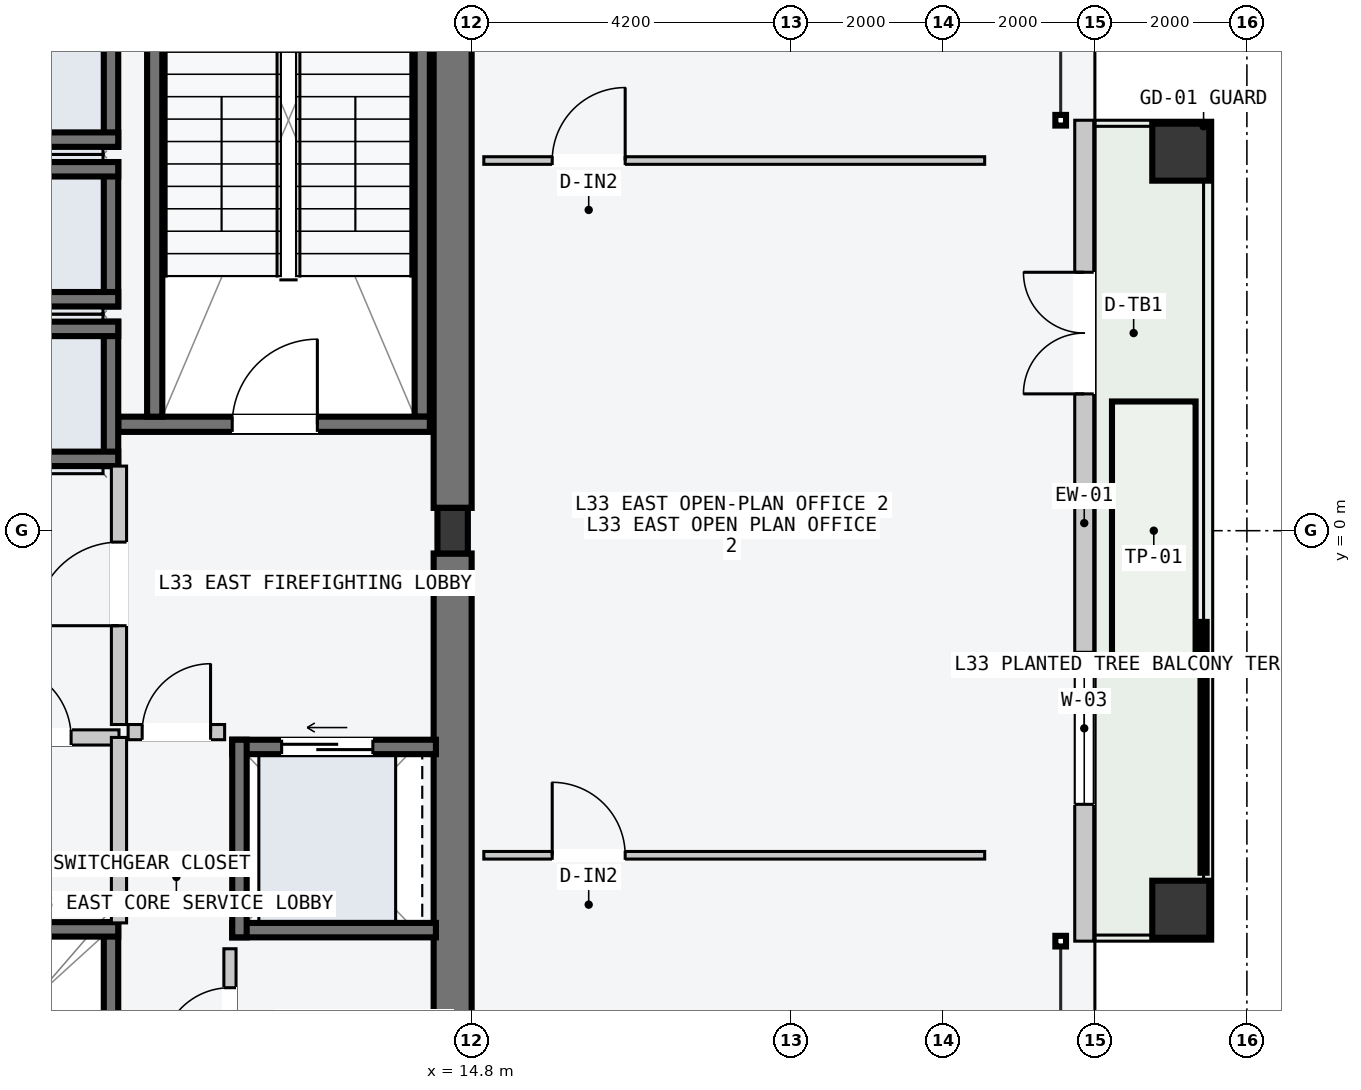
"""IFC4 building model, lengths in metres.
Left out: names, types, materials, properties, quantities, classifications, styles, units other than length and angle.
Written with IfcOpenShell. Run it as: python <this file> out.ifc"""

import sys

from ifc_helpers import new_model, si_unit, direction, frame, frame_2d, origin, origin_2d, place, context, subcontext, project, spatial, rectangle, hollow_rectangle, i_section, extrude, element, fill, save


model = new_model("IFC4")
c1 = context("Model", 3, precision=1e-05, world=origin(), true_north=direction((0.0, 1.0)))
c2 = subcontext(c1, "Body", "Model", "MODEL_VIEW")
j1 = project(units=[si_unit("LENGTHUNIT", "METRE"), si_unit("PLANEANGLEUNIT", "RADIAN")], contexts=[c1])
p1 = place(None, origin())
s1 = spatial("IfcSite", under=j1, at=p1, CompositionType="ELEMENT")
p2 = place(p1, origin())
s2 = spatial("IfcBuilding", under=s1, at=p2, CompositionType="ELEMENT")
p3 = place(p2, frame((0.0, 0.0, 127.8)))
s3 = spatial("IfcBuildingStorey", under=s2, at=p3, CompositionType="ELEMENT", Elevation=127.8)
for number, where, z_axis, x_axis in (
    (1, (14.55, -9.45, -0.2), (0.0, 0.0, 1.0), (0.0, 1.0, 0.0)),
    (2, (14.55, 0.3, -0.2), (0.0, 0.0, 1.0), (0.0, 1.0, 0.0)),
):
    element("IfcWall", number, at=place(p3, frame(where, z_axis=z_axis, x_axis=x_axis)), inside=s3, PredefinedType="SHEAR", context=c2, shape_type="SweptSolid", body=[
        extrude(rectangle(XDim=9.15, YDim=0.5, at=frame_2d((4.575, 0.0))), origin(), (0.0, 0.0, 1.0), 3.6),
    ])
p4 = place(p3, frame((14.15, 1.5, -0.2), z_axis=(0.0, 0.0, 1.0), x_axis=(0.0, 1.0, 0.0)))
e3 = element("IfcWall", 3, at=p4, inside=s3, PredefinedType="SOLIDWALL", context=c2, shape_type="SweptSolid", body=[
    extrude(rectangle(XDim=7.8, YDim=0.2, at=frame_2d((3.9, 0.0))), origin(), (0.0, 0.0, 1.0), 3.6),
])
p5 = place(p3, frame((10.15, 1.4, -0.2), z_axis=(0.0, 0.0, 1.0), x_axis=(1.0, 0.0, 0.0)))
e4 = element("IfcWall", 4, at=p5, inside=s3, PredefinedType="SOLIDWALL", context=c2, shape_type="SweptSolid", body=[
    extrude(rectangle(XDim=4.1, YDim=0.2, at=frame_2d((2.05, 0.0))), origin(), (0.0, 0.0, 1.0), 3.6),
])
p6 = place(p5, frame((1.5, 0.0, 0.2)))
e5 = element("IfcOpeningElement", 5, at=p6, cuts=e4, PredefinedType="OPENING", context=c2, shape_type="SweptSolid", body=[
    extrude(rectangle(XDim=1.12, YDim=2.18, at=frame_2d((0.56, 1.09))), frame((0.0, 0.11, 0.0), z_axis=(0.0, -1.0, 0.0), x_axis=(1.0, 0.0, 0.0)), (0.0, 0.0, 1.0), 0.22),
])
p7 = place(p3, frame((10.63, 1.5, -0.2), z_axis=(0.0, 0.0, 1.0), x_axis=(0.0, 1.0, 0.0)))
e6 = element("IfcWall", 6, at=p7, inside=s3, PredefinedType="SOLIDWALL", context=c2, shape_type="SweptSolid", body=[
    extrude(rectangle(XDim=7.8, YDim=0.2, at=frame_2d((3.9, 0.0))), origin(), (0.0, 0.0, 1.0), 3.6),
])
p8 = place(p3, frame((14.55, 0.0, 0.0), z_axis=(0.0, 0.0, 1.0), x_axis=(1.0, 0.0, 0.0)))
e7 = element("IfcColumn", 7, at=p8, inside=s3, PredefinedType="COLUMN", context=c2, shape_type="SweptSolid", body=[
    extrude(i_section(OverallWidth=0.4, OverallDepth=0.6, WebThickness=0.022, FlangeThickness=0.036, at=origin_2d()), origin(), (0.0, 0.0, 1.0), 3.6),
])
for number, where, z_axis, x_axis in (
    (8, (24.13, -4.98, 0.0), (0.0, 0.0, 1.0), (0.0, 1.0, 0.0)),
    (9, (24.13, 4.98, 0.0), (0.0, 0.0, 1.0), (0.0, 1.0, 0.0)),
):
    element("IfcColumn", number, at=place(p3, frame(where, z_axis=z_axis, x_axis=x_axis)), inside=s3, PredefinedType="COLUMN", context=c2, shape_type="SweptSolid", body=[
        extrude(hollow_rectangle(XDim=0.75, YDim=0.75, WallThickness=0.032, at=origin_2d()), origin(), (0.0, 0.0, 1.0), 3.6),
    ])
p9 = place(p3, frame((22.86, -5.4, 0.0), z_axis=(0.0, 0.0, 1.0), x_axis=(0.0, 1.0, 0.0)))
e10 = element("IfcWall", 10, at=p9, inside=s3, PredefinedType="STANDARD", context=c2, shape_type="SweptSolid", body=[
    extrude(rectangle(XDim=10.8, YDim=0.25, at=frame_2d((5.4, 0.0))), origin(), (0.0, 0.0, 1.0), 3.4),
])
p10 = place(p9, frame((7.2, 0.0, 0.0)))
e11 = element("IfcOpeningElement", 11, at=p10, cuts=e10, PredefinedType="OPENING", context=c2, shape_type="SweptSolid", body=[
    extrude(rectangle(XDim=1.6, YDim=2.2, at=frame_2d((0.8, 1.1))), frame((0.0, 0.135, 0.0), z_axis=(0.0, -1.0, 0.0), x_axis=(1.0, 0.0, 0.0)), (0.0, 0.0, 1.0), 0.27),
])
p11 = place(p9, frame((1.8, 0.0, 0.85)))
e12 = element("IfcOpeningElement", 12, at=p11, cuts=e10, PredefinedType="OPENING", context=c2, shape_type="SweptSolid", body=[
    extrude(rectangle(XDim=2.0, YDim=2.1, at=frame_2d((1.0, 1.05))), frame((0.0, 0.135, 0.0), z_axis=(0.0, -1.0, 0.0), x_axis=(1.0, 0.0, 0.0)), (0.0, 0.0, 1.0), 0.27),
])
p12 = place(p3, frame((10.055, 0.85, -0.2), z_axis=(0.0, 0.0, 1.0), x_axis=(0.0, 1.0, 0.0)))
e13 = element("IfcWall", 13, at=p12, inside=s3, PredefinedType="SOLIDWALL", context=c2, shape_type="SweptSolid", body=[
    extrude(rectangle(XDim=1.9, YDim=0.19, at=frame_2d((0.95, 0.0))), origin(), (0.0, 0.0, 1.0), 3.6),
])
for number, where, z_axis, x_axis in (
    (14, (7.95, 2.655, -0.2), (0.0, 0.0, 1.0), (1.0, 0.0, 0.0)),
    (15, (7.95, 0.945, -0.2), (0.0, 0.0, 1.0), (1.0, 0.0, 0.0)),
):
    element("IfcWall", number, at=place(p3, frame(where, z_axis=z_axis, x_axis=x_axis)), inside=s3, PredefinedType="SOLIDWALL", context=c2, shape_type="SweptSolid", body=[
        extrude(rectangle(XDim=2.2, YDim=0.19, at=frame_2d((1.1, 0.0))), origin(), (0.0, 0.0, 1.0), 3.6),
    ])
p13 = place(p3, frame((10.055, 2.95, -0.2), z_axis=(0.0, 0.0, 1.0), x_axis=(0.0, 1.0, 0.0)))
e16 = element("IfcWall", 16, at=p13, inside=s3, PredefinedType="SOLIDWALL", context=c2, shape_type="SweptSolid", body=[
    extrude(rectangle(XDim=1.9, YDim=0.19, at=frame_2d((0.95, 0.0))), origin(), (0.0, 0.0, 1.0), 3.6),
])
for number, where, z_axis, x_axis in (
    (17, (7.95, 4.755, -0.2), (0.0, 0.0, 1.0), (1.0, 0.0, 0.0)),
    (18, (7.95, 3.045, -0.2), (0.0, 0.0, 1.0), (1.0, 0.0, 0.0)),
):
    element("IfcWall", number, at=place(p3, frame(where, z_axis=z_axis, x_axis=x_axis)), inside=s3, PredefinedType="SOLIDWALL", context=c2, shape_type="SweptSolid", body=[
        extrude(rectangle(XDim=2.2, YDim=0.19, at=frame_2d((1.1, 0.0))), origin(), (0.0, 0.0, 1.0), 3.6),
    ])
p14 = place(p3, frame((10.055, 5.05, -0.2), z_axis=(0.0, 0.0, 1.0), x_axis=(0.0, 1.0, 0.0)))
e19 = element("IfcWall", 19, at=p14, inside=s3, PredefinedType="SOLIDWALL", context=c2, shape_type="SweptSolid", body=[
    extrude(rectangle(XDim=1.9, YDim=0.19, at=frame_2d((0.95, 0.0))), origin(), (0.0, 0.0, 1.0), 3.6),
])
p15 = place(p3, frame((7.95, 5.145, -0.2), z_axis=(0.0, 0.0, 1.0), x_axis=(1.0, 0.0, 0.0)))
e20 = element("IfcWall", 20, at=p15, inside=s3, PredefinedType="SOLIDWALL", context=c2, shape_type="SweptSolid", body=[
    extrude(rectangle(XDim=2.2, YDim=0.19, at=frame_2d((1.1, 0.0))), origin(), (0.0, 0.0, 1.0), 3.6),
])
p16 = place(p3, frame((10.055, -7.15, -0.2), z_axis=(0.0, 0.0, 1.0), x_axis=(0.0, 1.0, 0.0)))
e21 = element("IfcWall", 21, at=p16, inside=s3, PredefinedType="SOLIDWALL", context=c2, shape_type="SweptSolid", body=[
    extrude(rectangle(XDim=2.0, YDim=0.19, at=frame_2d((1.0, 0.0))), origin(), (0.0, 0.0, 1.0), 3.6),
])
p17 = place(p3, frame((7.95, -5.245, -0.2), z_axis=(0.0, 0.0, 1.0), x_axis=(1.0, 0.0, 0.0)))
e22 = element("IfcWall", 22, at=p17, inside=s3, PredefinedType="SOLIDWALL", context=c2, shape_type="SweptSolid", body=[
    extrude(rectangle(XDim=2.2, YDim=0.19, at=frame_2d((1.1, 0.0))), origin(), (0.0, 0.0, 1.0), 3.6),
])
p18 = place(p3, frame((11.65, -2.845, -0.2), z_axis=(0.0, 0.0, 1.0), x_axis=(1.0, 0.0, 0.0)))
e23 = element("IfcWall", 23, at=p18, inside=s3, PredefinedType="SOLIDWALL", context=c2, shape_type="SweptSolid", body=[
    extrude(rectangle(XDim=2.68, YDim=0.19, at=frame_2d((1.34, 0.0))), origin(), (0.0, 0.0, 1.0), 3.6),
])
p19 = place(p18, frame((0.65, 0.0, 0.2)))
e24 = element("IfcOpeningElement", 24, at=p19, cuts=e23, PredefinedType="OPENING", context=c2, shape_type="SweptSolid", body=[
    extrude(rectangle(XDim=1.2, YDim=2.2, at=frame_2d((0.6, 1.1))), frame((0.0, 0.105, 0.0), z_axis=(0.0, -1.0, 0.0), x_axis=(1.0, 0.0, 0.0)), (0.0, 0.0, 1.0), 0.21),
])
p20 = place(p3, frame((11.65, -5.255, -0.2), z_axis=(0.0, 0.0, 1.0), x_axis=(1.0, 0.0, 0.0)))
e25 = element("IfcWall", 25, at=p20, inside=s3, PredefinedType="SOLIDWALL", context=c2, shape_type="SweptSolid", body=[
    extrude(rectangle(XDim=2.68, YDim=0.19, at=frame_2d((1.34, 0.0))), origin(), (0.0, 0.0, 1.0), 3.6),
])
p21 = place(p3, frame((11.745, -5.35, -0.2), z_axis=(0.0, 0.0, 1.0), x_axis=(0.0, 1.0, 0.0)))
e26 = element("IfcWall", 26, at=p21, inside=s3, PredefinedType="SOLIDWALL", context=c2, shape_type="SweptSolid", body=[
    extrude(rectangle(XDim=2.6, YDim=0.19, at=frame_2d((1.3, 0.0))), origin(), (0.0, 0.0, 1.0), 3.6),
])
p22 = place(p3, frame((10.16, -2.55, 0.0), z_axis=(0.0, 0.0, 1.0), x_axis=(0.0, 1.0, 0.0)))
e27 = element("IfcWall", 27, at=p22, inside=s3, PredefinedType="PARTITIONING", context=c2, shape_type="SweptSolid", body=[
    extrude(rectangle(XDim=3.4, YDim=0.2, at=frame_2d((1.7, 0.0))), origin(), (0.0, 0.0, 1.0), 3.4),
])
p23 = place(p22, frame((1.3, 0.0, 0.0)))
e28 = element("IfcOpeningElement", 28, at=p23, cuts=e27, PredefinedType="OPENING", context=c2, shape_type="SweptSolid", body=[
    extrude(rectangle(XDim=1.1, YDim=2.15, at=frame_2d((0.55, 1.075))), frame((0.0, 0.11, 0.0), z_axis=(0.0, -1.0, 0.0), x_axis=(1.0, 0.0, 0.0)), (0.0, 0.0, 1.0), 0.22),
])
p24 = place(p3, frame((10.28, -2.65, 0.0), z_axis=(0.0, 0.0, 1.0), x_axis=(1.0, 0.0, 0.0)))
e29 = element("IfcWall", 29, at=p24, inside=s3, PredefinedType="PARTITIONING", context=c2, shape_type="SweptSolid", body=[
    extrude(rectangle(XDim=1.27, YDim=0.2, at=frame_2d((0.635, 0.0))), origin(), (0.0, 0.0, 1.0), 3.4),
])
p25 = place(p24, frame((0.185, 0.0, 0.0)))
e30 = element("IfcOpeningElement", 30, at=p25, cuts=e29, PredefinedType="OPENING", context=c2, shape_type="SweptSolid", body=[
    extrude(rectangle(XDim=0.9, YDim=2.15, at=frame_2d((0.45, 1.075))), frame((0.0, 0.11, 0.0), z_axis=(0.0, -1.0, 0.0), x_axis=(1.0, 0.0, 0.0)), (0.0, 0.0, 1.0), 0.22),
])
p26 = place(p3, frame((7.96, -2.72, 0.0), z_axis=(0.0, 0.0, 1.0), x_axis=(1.0, 0.0, 0.0)))
e31 = element("IfcWall", 31, at=p26, inside=s3, PredefinedType="PARTITIONING", context=c2, shape_type="SweptSolid", body=[
    extrude(rectangle(XDim=2.2, YDim=0.2, at=frame_2d((1.1, 0.0))), origin(), (0.0, 0.0, 1.0), 3.4),
])
p27 = place(p26, frame((0.62, 0.0, 0.0)))
e32 = element("IfcOpeningElement", 32, at=p27, cuts=e31, PredefinedType="OPENING", context=c2, shape_type="SweptSolid", body=[
    extrude(rectangle(XDim=0.95, YDim=2.1, at=frame_2d((0.475, 1.05))), frame((0.0, 0.11, 0.0), z_axis=(0.0, -1.0, 0.0), x_axis=(1.0, 0.0, 0.0)), (0.0, 0.0, 1.0), 0.22),
])
p28 = place(p3, frame((10.16, -5.16, 0.0), z_axis=(0.0, 0.0, 1.0), x_axis=(0.0, 1.0, 0.0)))
e33 = element("IfcWall", 33, at=p28, inside=s3, PredefinedType="PARTITIONING", context=c2, shape_type="SweptSolid", body=[
    extrude(rectangle(XDim=2.44, YDim=0.2, at=frame_2d((1.22, 0.0))), origin(), (0.0, 0.0, 1.0), 3.4),
])
p29 = place(p3, frame((11.62, -9.35, 0.0), z_axis=(0.0, 0.0, 1.0), x_axis=(0.0, 1.0, 0.0)))
e34 = element("IfcWall", 34, at=p29, inside=s3, PredefinedType="PARTITIONING", context=c2, shape_type="SweptSolid", body=[
    extrude(rectangle(XDim=3.85, YDim=0.16, at=frame_2d((1.925, 0.0))), origin(), (0.0, 0.0, 1.0), 3.4),
])
p30 = place(p29, frame((0.512, 0.0, 0.0)))
e35 = element("IfcOpeningElement", 35, at=p30, cuts=e34, PredefinedType="OPENING", context=c2, shape_type="SweptSolid", body=[
    extrude(rectangle(XDim=0.9, YDim=2.15, at=frame_2d((0.45, 1.075))), frame((0.0, 0.09, 0.0), z_axis=(0.0, -1.0, 0.0), x_axis=(1.0, 0.0, 0.0)), (0.0, 0.0, 1.0), 0.18),
])
p31 = place(p29, frame((2.438, 0.0, 0.0)))
e36 = element("IfcOpeningElement", 36, at=p31, cuts=e34, PredefinedType="OPENING", context=c2, shape_type="SweptSolid", body=[
    extrude(rectangle(XDim=0.9, YDim=2.15, at=frame_2d((0.45, 1.075))), frame((0.0, 0.09, 0.0), z_axis=(0.0, -1.0, 0.0), x_axis=(1.0, 0.0, 0.0)), (0.0, 0.0, 1.0), 0.18),
])
p32 = place(p3, frame((14.96, -4.27, 0.0), z_axis=(0.0, 0.0, 1.0), x_axis=(1.0, 0.0, 0.0)))
e37 = element("IfcWall", 37, at=p32, inside=s3, PredefinedType="PARTITIONING", context=c2, shape_type="SweptSolid", body=[
    extrude(rectangle(XDim=6.59, YDim=0.1, at=frame_2d((3.295, 0.0))), origin(), (0.0, 0.0, 1.0), 3.4),
])
p33 = place(p32, frame((0.9, 0.0, 0.0)))
e38 = element("IfcOpeningElement", 38, at=p33, cuts=e37, PredefinedType="OPENING", context=c2, shape_type="SweptSolid", body=[
    extrude(rectangle(XDim=0.96, YDim=2.18, at=frame_2d((0.48, 1.09))), frame((0.0, 0.06, 0.0), z_axis=(0.0, -1.0, 0.0), x_axis=(1.0, 0.0, 0.0)), (0.0, 0.0, 1.0), 0.12),
])
p34 = place(p3, frame((14.96, 4.87, 0.0), z_axis=(0.0, 0.0, 1.0), x_axis=(1.0, 0.0, 0.0)))
e39 = element("IfcWall", 39, at=p34, inside=s3, PredefinedType="PARTITIONING", context=c2, shape_type="SweptSolid", body=[
    extrude(rectangle(XDim=6.59, YDim=0.1, at=frame_2d((3.295, 0.0))), origin(), (0.0, 0.0, 1.0), 3.4),
])
p35 = place(p34, frame((0.9, 0.0, 0.0)))
e40 = element("IfcOpeningElement", 40, at=p35, cuts=e39, PredefinedType="OPENING", context=c2, shape_type="SweptSolid", body=[
    extrude(rectangle(XDim=0.96, YDim=2.18, at=frame_2d((0.48, 1.09))), frame((0.0, 0.06, 0.0), z_axis=(0.0, -1.0, 0.0), x_axis=(1.0, 0.0, 0.0)), (0.0, 0.0, 1.0), 0.12),
])
p36 = place(p6, origin())
e41 = element("IfcDoor", 41, at=p36, inside=s3, OperationType="SINGLE_SWING_RIGHT", PredefinedType="DOOR", context=c2, shape_type="SweptSolid", body=[
    extrude(rectangle(XDim=1.12, YDim=2.18, at=frame_2d((0.56, 1.09))), frame((0.0, 0.025, 0.0), z_axis=(0.0, -1.0, 0.0), x_axis=(1.0, 0.0, 0.0)), (0.0, 0.0, 1.0), 0.05),
])
fill(e5, e41)
p37 = place(p10, origin())
e42 = element("IfcDoor", 42, at=p37, inside=s3, OperationType="DOUBLE_DOOR_SINGLE_SWING", PredefinedType="DOOR", context=c2, shape_type="SweptSolid", body=[
    extrude(rectangle(XDim=1.6, YDim=2.2, at=frame_2d((0.8, 1.1))), frame((0.0, 0.025, 0.0), z_axis=(0.0, -1.0, 0.0), x_axis=(1.0, 0.0, 0.0)), (0.0, 0.0, 1.0), 0.05),
])
fill(e11, e42)
p38 = place(p11, origin())
e43 = element("IfcWindow", 43, at=p38, inside=s3, PartitioningType="SINGLE_PANEL", PredefinedType="WINDOW", context=c2, shape_type="SweptSolid", body=[
    extrude(rectangle(XDim=2.0, YDim=2.1, at=frame_2d((1.0, 1.05))), frame((0.0, 0.03, 0.0), z_axis=(0.0, -1.0, 0.0), x_axis=(1.0, 0.0, 0.0)), (0.0, 0.0, 1.0), 0.06),
])
fill(e12, e43)
p39 = place(p19, origin())
e44 = element("IfcDoor", 44, at=p39, inside=s3, OperationType="SLIDING_TO_LEFT", PredefinedType="DOOR", context=c2, shape_type="SweptSolid", body=[
    extrude(rectangle(XDim=1.2, YDim=2.2, at=frame_2d((0.6, 1.1))), frame((0.0, 0.025, 0.0), z_axis=(0.0, -1.0, 0.0), x_axis=(1.0, 0.0, 0.0)), (0.0, 0.0, 1.0), 0.05),
])
fill(e24, e44)
p40 = place(p23, origin())
e45 = element("IfcDoor", 45, at=p40, inside=s3, OperationType="SINGLE_SWING_LEFT", PredefinedType="DOOR", context=c2, shape_type="SweptSolid", body=[
    extrude(rectangle(XDim=1.1, YDim=2.15, at=frame_2d((0.55, 1.075))), frame((0.0, 0.025, 0.0), z_axis=(0.0, -1.0, 0.0), x_axis=(1.0, 0.0, 0.0)), (0.0, 0.0, 1.0), 0.05),
])
fill(e28, e45)
p41 = place(p25, origin())
e46 = element("IfcDoor", 46, at=p41, inside=s3, OperationType="SINGLE_SWING_RIGHT", PredefinedType="DOOR", context=c2, shape_type="SweptSolid", body=[
    extrude(rectangle(XDim=0.9, YDim=2.15, at=frame_2d((0.45, 1.075))), frame((0.0, 0.025, 0.0), z_axis=(0.0, -1.0, 0.0), x_axis=(1.0, 0.0, 0.0)), (0.0, 0.0, 1.0), 0.05),
])
fill(e30, e46)
p42 = place(p27, origin())
e47 = element("IfcDoor", 47, at=p42, inside=s3, OperationType="SINGLE_SWING_LEFT", PredefinedType="DOOR", context=c2, shape_type="SweptSolid", body=[
    extrude(rectangle(XDim=0.95, YDim=2.1, at=frame_2d((0.475, 1.05))), frame((0.0, 0.025, 0.0), z_axis=(0.0, -1.0, 0.0), x_axis=(1.0, 0.0, 0.0)), (0.0, 0.0, 1.0), 0.05),
])
fill(e32, e47)
p43 = place(p31, origin())
e48 = element("IfcDoor", 48, at=p43, inside=s3, OperationType="SINGLE_SWING_LEFT", PredefinedType="DOOR", context=c2, shape_type="SweptSolid", body=[
    extrude(rectangle(XDim=0.9, YDim=2.15, at=frame_2d((0.45, 1.075))), frame((0.0, 0.025, 0.0), z_axis=(0.0, -1.0, 0.0), x_axis=(1.0, 0.0, 0.0)), (0.0, 0.0, 1.0), 0.05),
])
fill(e36, e48)
p44 = place(p33, origin())
e49 = element("IfcDoor", 49, at=p44, inside=s3, OperationType="SINGLE_SWING_LEFT", PredefinedType="DOOR", context=c2, shape_type="SweptSolid", body=[
    extrude(rectangle(XDim=0.96, YDim=2.18, at=frame_2d((0.48, 1.09))), frame((0.0, 0.025, 0.0), z_axis=(0.0, -1.0, 0.0), x_axis=(1.0, 0.0, 0.0)), (0.0, 0.0, 1.0), 0.05),
])
fill(e38, e49)
p45 = place(p35, origin())
e50 = element("IfcDoor", 50, at=p45, inside=s3, OperationType="SINGLE_SWING_RIGHT", PredefinedType="DOOR", context=c2, shape_type="SweptSolid", body=[
    extrude(rectangle(XDim=0.96, YDim=2.18, at=frame_2d((0.48, 1.09))), frame((0.0, 0.025, 0.0), z_axis=(0.0, -1.0, 0.0), x_axis=(1.0, 0.0, 0.0)), (0.0, 0.0, 1.0), 0.05),
])
fill(e40, e50)
save(model, sys.argv[1])
